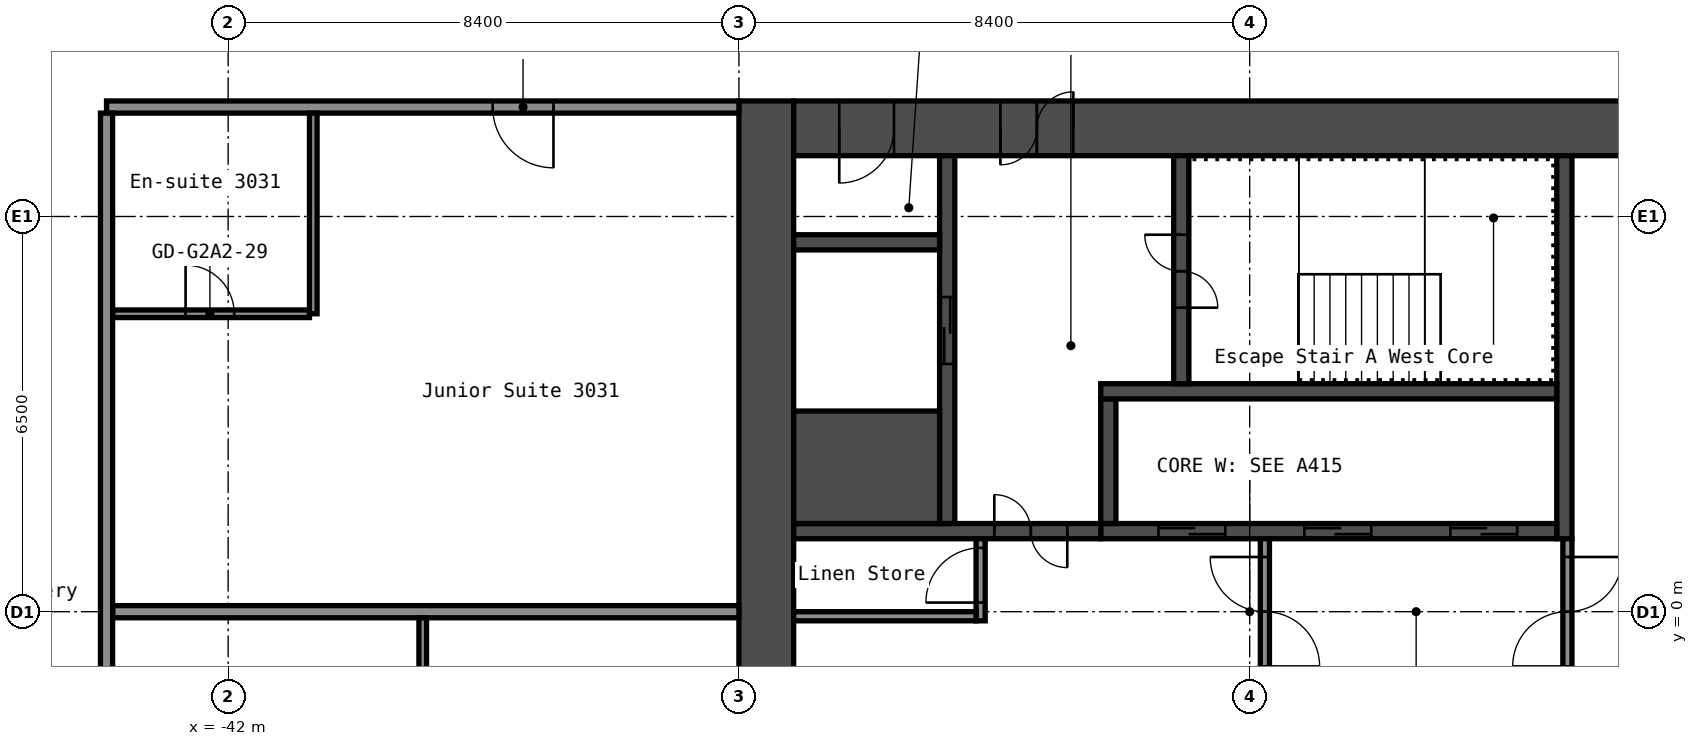
"""IFC4 building model, lengths in metres.
Left out: names, types, materials, properties, quantities, classifications, styles, units other than length and angle.
Written with IfcOpenShell. Run it as: python <this file> out.ifc"""

import sys

from ifc_helpers import new_model, si_unit, direction, frame, frame_2d, origin, place, context, subcontext, project, spatial, rectangle, extrude, element, fill, save


model = new_model("IFC4")
c1 = context("Model", 3, precision=1e-05, world=origin(), true_north=direction((0.0, 1.0)))
c2 = subcontext(c1, "Body", "Model", "MODEL_VIEW")
j1 = project(units=[si_unit("LENGTHUNIT", "METRE"), si_unit("PLANEANGLEUNIT", "RADIAN")], contexts=[c1])
p1 = place(None, origin())
s1 = spatial("IfcSite", under=j1, at=p1, CompositionType="ELEMENT")
p2 = place(p1, origin())
s2 = spatial("IfcBuilding", under=s1, at=p2, CompositionType="ELEMENT")
p3 = place(p2, frame((0.0, 0.0, 107.4)))
s3 = spatial("IfcBuildingStorey", under=s2, at=p3, CompositionType="ELEMENT", Elevation=107.4)
p4 = place(p3, frame((-33.15, -8.4, 0.0), z_axis=(0.0, 0.0, 1.0), x_axis=(0.0, 1.0, 0.0)))
e1 = element("IfcWall", 1, at=p4, inside=s3, PredefinedType="SHEAR", context=c2, shape_type="SweptSolid", body=[
    extrude(rectangle(XDim=16.8, YDim=0.9, at=frame_2d((8.4, 0.0))), origin(), (0.0, 0.0, 1.0), 2.8),
])
p5 = place(p3, frame((-32.7, 7.95, 0.0), z_axis=(0.0, 0.0, 1.0), x_axis=(1.0, 0.0, 0.0)))
e2 = element("IfcWall", 2, at=p5, inside=s3, PredefinedType="SHEAR", context=c2, shape_type="SweptSolid", body=[
    extrude(rectangle(XDim=15.0, YDim=0.9, at=frame_2d((7.5, 0.0))), origin(), (0.0, 0.0, 1.0), 2.8),
])
p6 = place(p5, frame((3.4, 0.0, 0.0)))
e3 = element("IfcOpeningElement", 3, at=p6, cuts=e2, PredefinedType="OPENING", context=c2, shape_type="SweptSolid", body=[
    extrude(rectangle(XDim=1.2, YDim=2.1, at=frame_2d((0.6, 1.05))), frame((0.0, 0.46, 0.0), z_axis=(0.0, -1.0, 0.0), x_axis=(1.0, 0.0, 0.0)), (0.0, 0.0, 1.0), 0.92),
])
p7 = place(p5, frame((0.75, 0.0, 0.0)))
e4 = element("IfcOpeningElement", 4, at=p7, cuts=e2, PredefinedType="OPENING", context=c2, shape_type="SweptSolid", body=[
    extrude(rectangle(XDim=0.9, YDim=2.1, at=frame_2d((0.45, 1.05))), frame((0.0, 0.46, 0.0), z_axis=(0.0, -1.0, 0.0), x_axis=(1.0, 0.0, 0.0)), (0.0, 0.0, 1.0), 0.92),
])
p8 = place(p3, frame((-20.025, 1.2, 0.0), z_axis=(0.0, 0.0, 1.0), x_axis=(0.0, 1.0, 0.0)))
e5 = element("IfcWall", 5, at=p8, inside=s3, PredefinedType="SHEAR", context=c2, shape_type="SweptSolid", body=[
    extrude(rectangle(XDim=6.3, YDim=0.25, at=frame_2d((3.15, 0.0))), origin(), (0.0, 0.0, 1.0), 2.8),
])
p9 = place(p3, frame((-27.65, 1.325, 0.0), z_axis=(0.0, 0.0, 1.0), x_axis=(1.0, 0.0, 0.0)))
e6 = element("IfcWall", 6, at=p9, inside=s3, PredefinedType="SHEAR", context=c2, shape_type="SweptSolid", body=[
    extrude(rectangle(XDim=7.5, YDim=0.25, at=frame_2d((3.75, 0.0))), origin(), (0.0, 0.0, 1.0), 2.8),
])
p10 = place(p9, frame((5.75, 0.0, 0.0)))
e7 = element("IfcOpeningElement", 7, at=p10, cuts=e6, PredefinedType="OPENING", context=c2, shape_type="SweptSolid", body=[
    extrude(rectangle(XDim=1.1, YDim=2.1, at=frame_2d((0.55, 1.05))), frame((0.0, 0.135, 0.0), z_axis=(0.0, -1.0, 0.0), x_axis=(1.0, 0.0, 0.0)), (0.0, 0.0, 1.0), 0.27),
])
p11 = place(p9, frame((3.35, 0.0, 0.0)))
e8 = element("IfcOpeningElement", 8, at=p11, cuts=e6, PredefinedType="OPENING", context=c2, shape_type="SweptSolid", body=[
    extrude(rectangle(XDim=1.1, YDim=2.1, at=frame_2d((0.55, 1.05))), frame((0.0, 0.135, 0.0), z_axis=(0.0, -1.0, 0.0), x_axis=(1.0, 0.0, 0.0)), (0.0, 0.0, 1.0), 0.27),
])
p12 = place(p9, frame((0.95, 0.0, 0.0)))
e9 = element("IfcOpeningElement", 9, at=p12, cuts=e6, PredefinedType="OPENING", context=c2, shape_type="SweptSolid", body=[
    extrude(rectangle(XDim=1.1, YDim=2.1, at=frame_2d((0.55, 1.05))), frame((0.0, 0.135, 0.0), z_axis=(0.0, -1.0, 0.0), x_axis=(1.0, 0.0, 0.0)), (0.0, 0.0, 1.0), 0.27),
])
p13 = place(p3, frame((-27.525, 1.45, 0.0), z_axis=(0.0, 0.0, 1.0), x_axis=(0.0, 1.0, 0.0)))
e10 = element("IfcWall", 10, at=p13, inside=s3, PredefinedType="SHEAR", context=c2, shape_type="SweptSolid", body=[
    extrude(rectangle(XDim=2.05, YDim=0.25, at=frame_2d((1.025, 0.0))), origin(), (0.0, 0.0, 1.0), 2.8),
])
p14 = place(p3, frame((-27.65, 3.625, 0.0), z_axis=(0.0, 0.0, 1.0), x_axis=(1.0, 0.0, 0.0)))
e11 = element("IfcWall", 11, at=p14, inside=s3, PredefinedType="SHEAR", context=c2, shape_type="SweptSolid", body=[
    extrude(rectangle(XDim=7.5, YDim=0.25, at=frame_2d((3.75, 0.0))), origin(), (0.0, 0.0, 1.0), 2.8),
])
p15 = place(p3, frame((-26.325, 3.75, 0.0), z_axis=(0.0, 0.0, 1.0), x_axis=(0.0, 1.0, 0.0)))
e12 = element("IfcWall", 12, at=p15, inside=s3, PredefinedType="SHEAR", context=c2, shape_type="SweptSolid", body=[
    extrude(rectangle(XDim=3.75, YDim=0.25, at=frame_2d((1.875, 0.0))), origin(), (0.0, 0.0, 1.0), 2.8),
])
p16 = place(p15, frame((1.25, 0.0, 0.0)))
e13 = element("IfcOpeningElement", 13, at=p16, cuts=e12, PredefinedType="OPENING", context=c2, shape_type="SweptSolid", body=[
    extrude(rectangle(XDim=1.2, YDim=2.1, at=frame_2d((0.6, 1.05))), frame((0.0, 0.135, 0.0), z_axis=(0.0, -1.0, 0.0), x_axis=(1.0, 0.0, 0.0)), (0.0, 0.0, 1.0), 0.27),
])
p17 = place(p3, frame((-32.7, 1.325, 0.0), z_axis=(0.0, 0.0, 1.0), x_axis=(1.0, 0.0, 0.0)))
e14 = element("IfcWall", 14, at=p17, inside=s3, PredefinedType="SHEAR", context=c2, shape_type="SweptSolid", body=[
    extrude(rectangle(XDim=5.05, YDim=0.25, at=frame_2d((2.525, 0.0))), origin(), (0.0, 0.0, 1.0), 2.8),
])
p18 = place(p17, frame((3.3, 0.0, 0.0)))
e15 = element("IfcOpeningElement", 15, at=p18, cuts=e14, PredefinedType="OPENING", context=c2, shape_type="SweptSolid", body=[
    extrude(rectangle(XDim=1.2, YDim=2.1, at=frame_2d((0.6, 1.05))), frame((0.0, 0.135, 0.0), z_axis=(0.0, -1.0, 0.0), x_axis=(1.0, 0.0, 0.0)), (0.0, 0.0, 1.0), 0.27),
])
p19 = place(p3, frame((-30.175, 1.45, 0.0), z_axis=(0.0, 0.0, 1.0), x_axis=(0.0, 1.0, 0.0)))
e16 = element("IfcWall", 16, at=p19, inside=s3, PredefinedType="SHEAR", context=c2, shape_type="SweptSolid", body=[
    extrude(rectangle(XDim=6.05, YDim=0.25, at=frame_2d((3.025, 0.0))), origin(), (0.0, 0.0, 1.0), 2.8),
])
p20 = place(p19, frame((2.625, 0.0, 0.0)))
e17 = element("IfcOpeningElement", 17, at=p20, cuts=e16, PredefinedType="OPENING", context=c2, shape_type="SweptSolid", body=[
    extrude(rectangle(XDim=1.1, YDim=2.1, at=frame_2d((0.55, 1.05))), frame((0.0, 0.135, 0.0), z_axis=(0.0, -1.0, 0.0), x_axis=(1.0, 0.0, 0.0)), (0.0, 0.0, 1.0), 0.27),
])
p21 = place(p3, frame((-32.7, 2.375, 0.0), z_axis=(0.0, 0.0, 1.0), x_axis=(1.0, 0.0, 0.0)))
e18 = element("IfcWall", 18, at=p21, inside=s3, PredefinedType="SHEAR", context=c2, shape_type="SweptSolid", body=[
    extrude(rectangle(XDim=2.4, YDim=1.85, at=frame_2d((1.2, 0.0))), origin(), (0.0, 0.0, 1.0), 2.8),
])
p22 = place(p3, frame((-32.7, 6.075, 0.0), z_axis=(0.0, 0.0, 1.0), x_axis=(1.0, 0.0, 0.0)))
e19 = element("IfcWall", 19, at=p22, inside=s3, PredefinedType="SHEAR", context=c2, shape_type="SweptSolid", body=[
    extrude(rectangle(XDim=2.4, YDim=0.25, at=frame_2d((1.2, 0.0))), origin(), (0.0, 0.0, 1.0), 2.8),
])
p23 = place(p3, frame((-19.975, -1.2, 0.0), z_axis=(0.0, 0.0, 1.0), x_axis=(0.0, 1.0, 0.0)))
e20 = element("IfcWall", 20, at=p23, inside=s3, PredefinedType="PARTITIONING", context=c2, shape_type="SweptSolid", body=[
    extrude(rectangle(XDim=2.4, YDim=0.15, at=frame_2d((1.2, 0.0))), origin(), (0.0, 0.0, 1.0), 2.8),
])
p24 = place(p23, frame((0.3, 0.0, 0.0)))
e21 = element("IfcOpeningElement", 21, at=p24, cuts=e20, PredefinedType="OPENING", context=c2, shape_type="SweptSolid", body=[
    extrude(rectangle(XDim=1.8, YDim=2.1, at=frame_2d((0.9, 1.05))), frame((0.0, 0.085, 0.0), z_axis=(0.0, -1.0, 0.0), x_axis=(1.0, 0.0, 0.0)), (0.0, 0.0, 1.0), 0.17),
])
p25 = place(p3, frame((-24.95, -1.2, 0.0), z_axis=(0.0, 0.0, 1.0), x_axis=(0.0, 1.0, 0.0)))
e22 = element("IfcWall", 22, at=p25, inside=s3, PredefinedType="PARTITIONING", context=c2, shape_type="SweptSolid", body=[
    extrude(rectangle(XDim=2.4, YDim=0.15, at=frame_2d((1.2, 0.0))), origin(), (0.0, 0.0, 1.0), 2.8),
])
p26 = place(p25, frame((0.3, 0.0, 0.0)))
e23 = element("IfcOpeningElement", 23, at=p26, cuts=e22, PredefinedType="OPENING", context=c2, shape_type="SweptSolid", body=[
    extrude(rectangle(XDim=1.8, YDim=2.1, at=frame_2d((0.9, 1.05))), frame((0.0, 0.085, 0.0), z_axis=(0.0, -1.0, 0.0), x_axis=(1.0, 0.0, 0.0)), (0.0, 0.0, 1.0), 0.17),
])
p27 = place(p3, frame((-29.625, -0.15, 0.0), z_axis=(0.0, 0.0, 1.0), x_axis=(0.0, 1.0, 0.0)))
e24 = element("IfcWall", 24, at=p27, inside=s3, PredefinedType="PARTITIONING", context=c2, shape_type="SweptSolid", body=[
    extrude(rectangle(XDim=1.35, YDim=0.15, at=frame_2d((0.675, 0.0))), origin(), (0.0, 0.0, 1.0), 2.8),
])
p28 = place(p27, frame((0.3, 0.0, 0.0)))
e25 = element("IfcOpeningElement", 25, at=p28, cuts=e24, PredefinedType="OPENING", context=c2, shape_type="SweptSolid", body=[
    extrude(rectangle(XDim=0.9, YDim=2.1, at=frame_2d((0.45, 1.05))), frame((0.0, 0.085, 0.0), z_axis=(0.0, -1.0, 0.0), x_axis=(1.0, 0.0, 0.0)), (0.0, 0.0, 1.0), 0.17),
])
p29 = place(p3, frame((-32.7, -0.075, 0.0), z_axis=(0.0, 0.0, 1.0), x_axis=(1.0, 0.0, 0.0)))
e26 = element("IfcWall", 26, at=p29, inside=s3, PredefinedType="PARTITIONING", context=c2, shape_type="SweptSolid", body=[
    extrude(rectangle(XDim=3.0, YDim=0.15, at=frame_2d((1.5, 0.0))), origin(), (0.0, 0.0, 1.0), 2.8),
])
p30 = place(p3, frame((-43.9, 0.0, 0.0), z_axis=(0.0, 0.0, 1.0), x_axis=(1.0, 0.0, 0.0)))
e27 = element("IfcWall", 27, at=p30, inside=s3, PredefinedType="PARTITIONING", context=c2, shape_type="SweptSolid", body=[
    extrude(rectangle(XDim=10.3, YDim=0.2, at=frame_2d((5.15, 0.0))), origin(), (0.0, 0.0, 1.0), 2.8),
])
p31 = place(p3, frame((-43.9, 4.9, 0.0), z_axis=(0.0, 0.0, 1.0), x_axis=(1.0, 0.0, 0.0)))
e28 = element("IfcWall", 28, at=p31, inside=s3, PredefinedType="PARTITIONING", context=c2, shape_type="SweptSolid", body=[
    extrude(rectangle(XDim=3.237, YDim=0.125, at=frame_2d((1.619, 0.0))), origin(), (0.0, 0.0, 1.0), 2.8),
])
p32 = place(p31, frame((1.2, 0.0, 0.0)))
e29 = element("IfcOpeningElement", 29, at=p32, cuts=e28, PredefinedType="OPENING", context=c2, shape_type="SweptSolid", body=[
    extrude(rectangle(XDim=0.8, YDim=2.1, at=frame_2d((0.4, 1.05))), frame((0.0, 0.073, 0.0), z_axis=(0.0, -1.0, 0.0), x_axis=(1.0, 0.0, 0.0)), (0.0, 0.0, 1.0), 0.145),
])
p33 = place(p3, frame((-44.0, 8.3, 0.0), z_axis=(0.0, 0.0, 1.0), x_axis=(1.0, 0.0, 0.0)))
e30 = element("IfcWall", 30, at=p33, inside=s3, PredefinedType="PARTITIONING", context=c2, shape_type="SweptSolid", body=[
    extrude(rectangle(XDim=10.4, YDim=0.2, at=frame_2d((5.2, 0.0))), origin(), (0.0, 0.0, 1.0), 2.8),
])
p34 = place(p33, frame((6.35, 0.0, 0.0)))
e31 = element("IfcOpeningElement", 31, at=p34, cuts=e30, PredefinedType="OPENING", context=c2, shape_type="SweptSolid", body=[
    extrude(rectangle(XDim=1.0, YDim=2.1, at=frame_2d((0.5, 1.05))), frame((0.0, 0.11, 0.0), z_axis=(0.0, -1.0, 0.0), x_axis=(1.0, 0.0, 0.0)), (0.0, 0.0, 1.0), 0.22),
])
p35 = place(p3, frame((-44.0, -8.2, 0.0), z_axis=(0.0, 0.0, 1.0), x_axis=(0.0, 1.0, 0.0)))
e32 = element("IfcWall", 32, at=p35, inside=s3, PredefinedType="PARTITIONING", context=c2, shape_type="SweptSolid", body=[
    extrude(rectangle(XDim=16.4, YDim=0.2, at=frame_2d((8.2, 0.0))), origin(), (0.0, 0.0, 1.0), 2.8),
])
p36 = place(p3, frame((-40.6, 4.9, 0.0), z_axis=(0.0, 0.0, 1.0), x_axis=(0.0, 1.0, 0.0)))
e33 = element("IfcWall", 33, at=p36, inside=s3, PredefinedType="PARTITIONING", context=c2, shape_type="SweptSolid", body=[
    extrude(rectangle(XDim=3.3, YDim=0.125, at=frame_2d((1.65, 0.0))), origin(), (0.0, 0.0, 1.0), 2.8),
])
p37 = place(p3, frame((-38.8, -8.2, 0.0), z_axis=(0.0, 0.0, 1.0), x_axis=(0.0, 1.0, 0.0)))
e34 = element("IfcWall", 34, at=p37, inside=s3, PredefinedType="PARTITIONING", context=c2, shape_type="SweptSolid", body=[
    extrude(rectangle(XDim=8.1, YDim=0.125, at=frame_2d((4.05, 0.0))), origin(), (0.0, 0.0, 1.0), 2.8),
])
p38 = place(p37, frame((4.05, 0.0, 0.0)))
e35 = element("IfcOpeningElement", 35, at=p38, cuts=e34, PredefinedType="OPENING", context=c2, shape_type="SweptSolid", body=[
    extrude(rectangle(XDim=0.9, YDim=2.1, at=frame_2d((0.45, 1.05))), frame((0.0, 0.073, 0.0), z_axis=(0.0, -1.0, 0.0), x_axis=(1.0, 0.0, 0.0)), (0.0, 0.0, 1.0), 0.145),
])
p39 = place(p6, origin())
e36 = element("IfcDoor", 36, at=p39, inside=s3, OperationType="DOUBLE_DOOR_SINGLE_SWING", PredefinedType="DOOR", context=c2, shape_type="SweptSolid", body=[
    extrude(rectangle(XDim=1.2, YDim=2.1, at=frame_2d((0.6, 1.05))), frame((0.0, 0.025, 0.0), z_axis=(0.0, -1.0, 0.0), x_axis=(1.0, 0.0, 0.0)), (0.0, 0.0, 1.0), 0.05),
])
fill(e3, e36)
p40 = place(p7, origin())
e37 = element("IfcDoor", 37, at=p40, inside=s3, OperationType="SINGLE_SWING_LEFT", PredefinedType="DOOR", context=c2, shape_type="SweptSolid", body=[
    extrude(rectangle(XDim=0.9, YDim=2.1, at=frame_2d((0.45, 1.05))), frame((0.0, 0.025, 0.0), z_axis=(0.0, -1.0, 0.0), x_axis=(1.0, 0.0, 0.0)), (0.0, 0.0, 1.0), 0.05),
])
fill(e4, e37)
p41 = place(p16, origin())
e38 = element("IfcDoor", 38, at=p41, inside=s3, OperationType="DOUBLE_DOOR_SINGLE_SWING", PredefinedType="DOOR", context=c2, shape_type="SweptSolid", body=[
    extrude(rectangle(XDim=1.2, YDim=2.1, at=frame_2d((0.6, 1.05))), frame((0.0, 0.025, 0.0), z_axis=(0.0, -1.0, 0.0), x_axis=(1.0, 0.0, 0.0)), (0.0, 0.0, 1.0), 0.05),
])
fill(e13, e38)
p42 = place(p18, origin())
e39 = element("IfcDoor", 39, at=p42, inside=s3, OperationType="DOUBLE_DOOR_SINGLE_SWING", PredefinedType="DOOR", context=c2, shape_type="SweptSolid", body=[
    extrude(rectangle(XDim=1.2, YDim=2.1, at=frame_2d((0.6, 1.05))), frame((0.0, 0.025, 0.0), z_axis=(0.0, -1.0, 0.0), x_axis=(1.0, 0.0, 0.0)), (0.0, 0.0, 1.0), 0.05),
])
fill(e15, e39)
p43 = place(p24, origin())
e40 = element("IfcDoor", 40, at=p43, inside=s3, OperationType="DOUBLE_DOOR_SINGLE_SWING", PredefinedType="DOOR", context=c2, shape_type="SweptSolid", body=[
    extrude(rectangle(XDim=1.8, YDim=2.1, at=frame_2d((0.9, 1.05))), frame((0.0, 0.025, 0.0), z_axis=(0.0, -1.0, 0.0), x_axis=(1.0, 0.0, 0.0)), (0.0, 0.0, 1.0), 0.05),
])
fill(e21, e40)
p44 = place(p26, origin())
e41 = element("IfcDoor", 41, at=p44, inside=s3, OperationType="DOUBLE_DOOR_SINGLE_SWING", PredefinedType="DOOR", context=c2, shape_type="SweptSolid", body=[
    extrude(rectangle(XDim=1.8, YDim=2.1, at=frame_2d((0.9, 1.05))), frame((0.0, 0.025, 0.0), z_axis=(0.0, -1.0, 0.0), x_axis=(1.0, 0.0, 0.0)), (0.0, 0.0, 1.0), 0.05),
])
fill(e23, e41)
p45 = place(p28, origin())
e42 = element("IfcDoor", 42, at=p45, inside=s3, OperationType="SINGLE_SWING_RIGHT", PredefinedType="DOOR", context=c2, shape_type="SweptSolid", body=[
    extrude(rectangle(XDim=0.9, YDim=2.1, at=frame_2d((0.45, 1.05))), frame((0.0, 0.025, 0.0), z_axis=(0.0, -1.0, 0.0), x_axis=(1.0, 0.0, 0.0)), (0.0, 0.0, 1.0), 0.05),
])
fill(e25, e42)
p46 = place(p10, origin())
e43 = element("IfcDoor", 43, at=p46, inside=s3, OperationType="DOUBLE_DOOR_SLIDING", PredefinedType="DOOR", context=c2, shape_type="SweptSolid", body=[
    extrude(rectangle(XDim=1.1, YDim=2.1, at=frame_2d((0.55, 1.05))), frame((0.0, 0.025, 0.0), z_axis=(0.0, -1.0, 0.0), x_axis=(1.0, 0.0, 0.0)), (0.0, 0.0, 1.0), 0.05),
])
fill(e7, e43)
p47 = place(p11, origin())
e44 = element("IfcDoor", 44, at=p47, inside=s3, OperationType="DOUBLE_DOOR_SLIDING", PredefinedType="DOOR", context=c2, shape_type="SweptSolid", body=[
    extrude(rectangle(XDim=1.1, YDim=2.1, at=frame_2d((0.55, 1.05))), frame((0.0, 0.025, 0.0), z_axis=(0.0, -1.0, 0.0), x_axis=(1.0, 0.0, 0.0)), (0.0, 0.0, 1.0), 0.05),
])
fill(e8, e44)
p48 = place(p12, origin())
e45 = element("IfcDoor", 45, at=p48, inside=s3, OperationType="DOUBLE_DOOR_SLIDING", PredefinedType="DOOR", context=c2, shape_type="SweptSolid", body=[
    extrude(rectangle(XDim=1.1, YDim=2.1, at=frame_2d((0.55, 1.05))), frame((0.0, 0.025, 0.0), z_axis=(0.0, -1.0, 0.0), x_axis=(1.0, 0.0, 0.0)), (0.0, 0.0, 1.0), 0.05),
])
fill(e9, e45)
p49 = place(p20, origin())
e46 = element("IfcDoor", 46, at=p49, inside=s3, OperationType="DOUBLE_DOOR_SLIDING", PredefinedType="DOOR", context=c2, shape_type="SweptSolid", body=[
    extrude(rectangle(XDim=1.1, YDim=2.1, at=frame_2d((0.55, 1.05))), frame((0.0, 0.025, 0.0), z_axis=(0.0, -1.0, 0.0), x_axis=(1.0, 0.0, 0.0)), (0.0, 0.0, 1.0), 0.05),
])
fill(e17, e46)
p50 = place(p32, origin())
e47 = element("IfcDoor", 47, at=p50, inside=s3, OperationType="SINGLE_SWING_RIGHT", PredefinedType="DOOR", context=c2, shape_type="SweptSolid", body=[
    extrude(rectangle(XDim=0.8, YDim=2.1, at=frame_2d((0.4, 1.05))), frame((0.0, 0.025, 0.0), z_axis=(0.0, -1.0, 0.0), x_axis=(1.0, 0.0, 0.0)), (0.0, 0.0, 1.0), 0.05),
])
fill(e29, e47)
p51 = place(p34, origin())
e48 = element("IfcDoor", 48, at=p51, inside=s3, OperationType="SINGLE_SWING_RIGHT", PredefinedType="DOOR", context=c2, shape_type="SweptSolid", body=[
    extrude(rectangle(XDim=1.0, YDim=2.1, at=frame_2d((0.5, 1.05))), frame((0.0, 0.025, 0.0), z_axis=(0.0, -1.0, 0.0), x_axis=(1.0, 0.0, 0.0)), (0.0, 0.0, 1.0), 0.05),
])
fill(e31, e48)
save(model, sys.argv[1])
